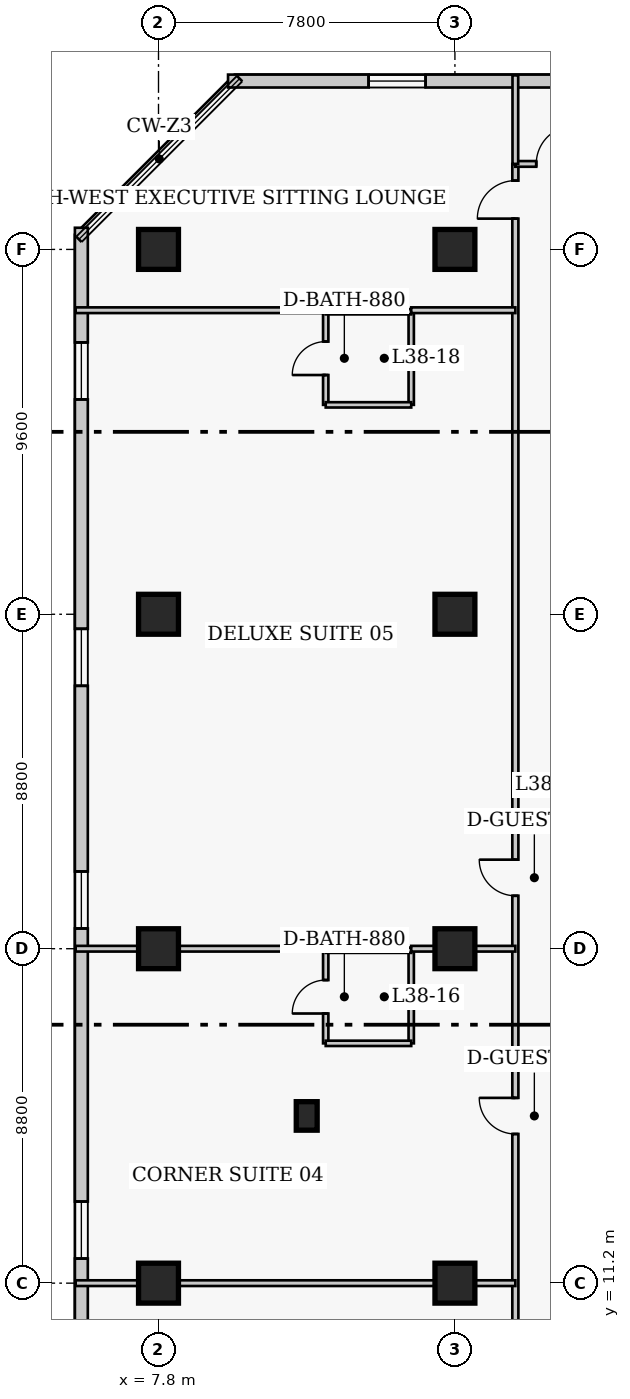
"""IFC4 building model, lengths in metres.
Left out: names, types, materials, properties, quantities, classifications, styles, units other than length and angle.
Written with IfcOpenShell. Run it as: python <this file> out.ifc"""

import sys

from ifc_helpers import new_model, si_unit, direction, frame, frame_2d, origin, origin_2d, place, context, subcontext, project, spatial, rectangle, extrude, element, fill, save


model = new_model("IFC4")
c1 = context("Model", 3, precision=1e-05, world=origin(), true_north=direction((0.0, 1.0)))
c2 = subcontext(c1, "Body", "Model", "MODEL_VIEW")
j1 = project(units=[si_unit("LENGTHUNIT", "METRE"), si_unit("PLANEANGLEUNIT", "RADIAN")], contexts=[c1])
p1 = place(None, origin())
s1 = spatial("IfcSite", under=j1, at=p1, CompositionType="ELEMENT")
p2 = place(p1, origin())
s2 = spatial("IfcBuilding", under=s1, at=p2, CompositionType="ELEMENT")
p3 = place(p2, frame((0.0, 0.0, 153.6)))
s3 = spatial("IfcBuildingStorey", under=s2, at=p3, CompositionType="ELEMENT", Elevation=153.6)
for number, where, z_axis, x_axis in (
    (1, (7.8, 11.2, 0.0), (0.0, 0.0, 1.0), (1.0, 0.0, 0.0)),
    (2, (7.8, 20.0, 0.0), (0.0, 0.0, 1.0), (1.0, 0.0, 0.0)),
    (3, (7.8, 28.8, 0.0), (0.0, 0.0, 1.0), (1.0, 0.0, 0.0)),
    (4, (7.8, 38.4, 0.0), (0.0, 0.0, 1.0), (1.0, 0.0, 0.0)),
    (5, (15.6, 11.2, 0.0), (0.0, 0.0, 1.0), (1.0, 0.0, 0.0)),
    (6, (15.6, 20.0, 0.0), (0.0, 0.0, 1.0), (1.0, 0.0, 0.0)),
    (7, (15.6, 28.8, 0.0), (0.0, 0.0, 1.0), (1.0, 0.0, 0.0)),
    (8, (15.6, 38.4, 0.0), (0.0, 0.0, 1.0), (1.0, 0.0, 0.0)),
):
    element("IfcColumn", number, at=place(p3, frame(where, z_axis=z_axis, x_axis=x_axis)), inside=s3, PredefinedType="COLUMN", context=c2, shape_type="SweptSolid", body=[
        extrude(rectangle(XDim=1.05, YDim=1.05, at=origin_2d()), origin(), (0.0, 0.0, 1.0), 3.8),
    ])
p4 = place(p3, frame((11.7, 15.6, 0.0), z_axis=(0.0, 0.0, 1.0), x_axis=(1.0, 0.0, 0.0)))
e9 = element("IfcColumn", 9, at=p4, inside=s3, PredefinedType="PILASTER", context=c2, shape_type="SweptSolid", body=[
    extrude(rectangle(XDim=0.55, YDim=0.75, at=origin_2d()), origin(), (0.0, 0.0, 1.0), 3.8),
])
p5 = place(p3, frame((36.32, 42.83, 0.0), z_axis=(0.0, 0.0, 1.0), x_axis=(-1.0, 0.0, 0.0)))
e10 = element("IfcWall", 10, at=p5, inside=s3, PredefinedType="SOLIDWALL", context=c2, shape_type="SweptSolid", body=[
    extrude(rectangle(XDim=26.69, YDim=0.34, at=frame_2d((13.345, 0.0))), origin(), (0.0, 0.0, 1.0), 3.55),
])
p6 = place(p5, frame((2.548, 0.0, 0.85)))
e11 = element("IfcOpeningElement", 11, at=p6, cuts=e10, PredefinedType="OPENING", context=c2, shape_type="SweptSolid", body=[
    extrude(rectangle(XDim=1.5, YDim=1.75, at=frame_2d((0.75, 0.875))), frame((0.0, 0.18, 0.0), z_axis=(0.0, -1.0, 0.0), x_axis=(1.0, 0.0, 0.0)), (0.0, 0.0, 1.0), 0.36),
])
p7 = place(p5, frame((12.595, 0.0, 0.85)))
e12 = element("IfcOpeningElement", 12, at=p7, cuts=e10, PredefinedType="OPENING", context=c2, shape_type="SweptSolid", body=[
    extrude(rectangle(XDim=1.5, YDim=1.75, at=frame_2d((0.75, 0.875))), frame((0.0, 0.18, 0.0), z_axis=(0.0, -1.0, 0.0), x_axis=(1.0, 0.0, 0.0)), (0.0, 0.0, 1.0), 0.36),
])
p8 = place(p5, frame((21.492, 0.0, 0.85)))
e13 = element("IfcOpeningElement", 13, at=p8, cuts=e10, PredefinedType="OPENING", context=c2, shape_type="SweptSolid", body=[
    extrude(rectangle(XDim=1.5, YDim=1.75, at=frame_2d((0.75, 0.875))), frame((0.0, 0.18, 0.0), z_axis=(0.0, -1.0, 0.0), x_axis=(1.0, 0.0, 0.0)), (0.0, 0.0, 1.0), 0.36),
])
p9 = place(p3, frame((5.77, 38.97, 0.0), z_axis=(0.0, 0.0, 1.0), x_axis=(0.0, -1.0, 0.0)))
e14 = element("IfcWall", 14, at=p9, inside=s3, PredefinedType="SOLIDWALL", context=c2, shape_type="SweptSolid", body=[
    extrude(rectangle(XDim=30.14, YDim=0.34, at=frame_2d((15.07, 0.0))), origin(), (0.0, 0.0, 1.0), 3.55),
])
p10 = place(p9, frame((3.018, 0.0, 0.85)))
e15 = element("IfcOpeningElement", 15, at=p10, cuts=e14, PredefinedType="OPENING", context=c2, shape_type="SweptSolid", body=[
    extrude(rectangle(XDim=1.5, YDim=1.75, at=frame_2d((0.75, 0.875))), frame((0.0, 0.18, 0.0), z_axis=(0.0, -1.0, 0.0), x_axis=(1.0, 0.0, 0.0)), (0.0, 0.0, 1.0), 0.36),
])
p11 = place(p9, frame((10.552, 0.0, 0.85)))
e16 = element("IfcOpeningElement", 16, at=p11, cuts=e14, PredefinedType="OPENING", context=c2, shape_type="SweptSolid", body=[
    extrude(rectangle(XDim=1.5, YDim=1.75, at=frame_2d((0.75, 0.875))), frame((0.0, 0.18, 0.0), z_axis=(0.0, -1.0, 0.0), x_axis=(1.0, 0.0, 0.0)), (0.0, 0.0, 1.0), 0.36),
])
p12 = place(p9, frame((16.938, 0.0, 0.85)))
e17 = element("IfcOpeningElement", 17, at=p12, cuts=e14, PredefinedType="OPENING", context=c2, shape_type="SweptSolid", body=[
    extrude(rectangle(XDim=1.5, YDim=1.75, at=frame_2d((0.75, 0.875))), frame((0.0, 0.18, 0.0), z_axis=(0.0, -1.0, 0.0), x_axis=(1.0, 0.0, 0.0)), (0.0, 0.0, 1.0), 0.36),
])
p13 = place(p9, frame((25.623, 0.0, 0.85)))
e18 = element("IfcOpeningElement", 18, at=p13, cuts=e14, PredefinedType="OPENING", context=c2, shape_type="SweptSolid", body=[
    extrude(rectangle(XDim=1.5, YDim=1.75, at=frame_2d((0.75, 0.875))), frame((0.0, 0.18, 0.0), z_axis=(0.0, -1.0, 0.0), x_axis=(1.0, 0.0, 0.0)), (0.0, 0.0, 1.0), 0.36),
])
p14 = place(p3, frame((17.19, 6.85, 0.0), z_axis=(0.0, 0.0, 1.0), x_axis=(0.0, 1.0, 0.0)))
e19 = element("IfcWall", 19, at=p14, inside=s3, PredefinedType="PARTITIONING", context=c2, shape_type="SweptSolid", body=[
    extrude(rectangle(XDim=33.8, YDim=0.16, at=frame_2d((16.9, 0.0))), origin(), (0.0, 0.0, 1.0), 3.55),
])
p15 = place(p14, frame((1.7, 0.0, 0.0)))
e20 = element("IfcOpeningElement", 20, at=p15, cuts=e19, PredefinedType="OPENING", context=c2, shape_type="SweptSolid", body=[
    extrude(rectangle(XDim=0.95, YDim=2.1, at=frame_2d((0.475, 1.05))), frame((0.0, 0.09, 0.0), z_axis=(0.0, -1.0, 0.0), x_axis=(1.0, 0.0, 0.0)), (0.0, 0.0, 1.0), 0.18),
])
p16 = place(p14, frame((8.275, 0.0, 0.0)))
e21 = element("IfcOpeningElement", 21, at=p16, cuts=e19, PredefinedType="OPENING", context=c2, shape_type="SweptSolid", body=[
    extrude(rectangle(XDim=0.95, YDim=2.1, at=frame_2d((0.475, 1.05))), frame((0.0, 0.09, 0.0), z_axis=(0.0, -1.0, 0.0), x_axis=(1.0, 0.0, 0.0)), (0.0, 0.0, 1.0), 0.18),
])
p17 = place(p14, frame((14.543, 0.0, 0.0)))
e22 = element("IfcOpeningElement", 22, at=p17, cuts=e19, PredefinedType="OPENING", context=c2, shape_type="SweptSolid", body=[
    extrude(rectangle(XDim=0.95, YDim=2.1, at=frame_2d((0.475, 1.05))), frame((0.0, 0.09, 0.0), z_axis=(0.0, -1.0, 0.0), x_axis=(1.0, 0.0, 0.0)), (0.0, 0.0, 1.0), 0.18),
])
p18 = place(p14, frame((32.36, 0.0, 0.0)))
e23 = element("IfcOpeningElement", 23, at=p18, cuts=e19, PredefinedType="OPENING", context=c2, shape_type="SweptSolid", body=[
    extrude(rectangle(XDim=1.0, YDim=2.15, at=frame_2d((0.5, 1.075))), frame((0.0, 0.09, 0.0), z_axis=(0.0, -1.0, 0.0), x_axis=(1.0, 0.0, 0.0)), (0.0, 0.0, 1.0), 0.18),
])
p19 = place(p3, frame((17.19, 40.65, 0.0), z_axis=(0.0, 0.0, 1.0), x_axis=(1.0, 0.0, 0.0)))
e24 = element("IfcWall", 24, at=p19, inside=s3, PredefinedType="PARTITIONING", context=c2, shape_type="SweptSolid", body=[
    extrude(rectangle(XDim=4.91, YDim=0.15, at=frame_2d((2.455, 0.0))), origin(), (0.0, 0.0, 1.0), 3.55),
])
p20 = place(p19, frame((0.55, 0.0, 0.0)))
e25 = element("IfcOpeningElement", 25, at=p20, cuts=e24, PredefinedType="OPENING", context=c2, shape_type="SweptSolid", body=[
    extrude(rectangle(XDim=1.0, YDim=2.15, at=frame_2d((0.5, 1.075))), frame((0.0, 0.085, 0.0), z_axis=(0.0, -1.0, 0.0), x_axis=(1.0, 0.0, 0.0)), (0.0, 0.0, 1.0), 0.17),
])
p21 = place(p3, frame((17.19, 40.65, 0.0), z_axis=(0.0, 0.0, 1.0), x_axis=(0.0, 1.0, 0.0)))
e26 = element("IfcWall", 26, at=p21, inside=s3, PredefinedType="PARTITIONING", context=c2, shape_type="SweptSolid", body=[
    extrude(rectangle(XDim=2.33, YDim=0.15, at=frame_2d((1.165, 0.0))), origin(), (0.0, 0.0, 1.0), 3.55),
])
p22 = place(p3, frame((5.62, 11.2, 0.0), z_axis=(0.0, 0.0, 1.0), x_axis=(1.0, 0.0, 0.0)))
e27 = element("IfcWall", 27, at=p22, inside=s3, PredefinedType="PARTITIONING", context=c2, shape_type="SweptSolid", body=[
    extrude(rectangle(XDim=11.57, YDim=0.15, at=frame_2d((5.785, 0.0))), origin(), (0.0, 0.0, 1.0), 2.778),
])
p23 = place(p3, frame((12.2, 17.51, 0.0), z_axis=(0.0, 0.0, 1.0), x_axis=(0.0, 1.0, 0.0)))
e28 = element("IfcWall", 28, at=p23, inside=s3, PredefinedType="PLUMBINGWALL", context=c2, shape_type="SweptSolid", body=[
    extrude(rectangle(XDim=2.45, YDim=0.14, at=frame_2d((1.225, 0.0))), origin(), (0.0, 0.0, 1.0), 3.55),
])
p24 = place(p23, frame((0.785, 0.0, 0.0)))
e29 = element("IfcOpeningElement", 29, at=p24, cuts=e28, PredefinedType="OPENING", context=c2, shape_type="SweptSolid", body=[
    extrude(rectangle(XDim=0.88, YDim=2.05, at=frame_2d((0.44, 1.025))), frame((0.0, 0.08, 0.0), z_axis=(0.0, -1.0, 0.0), x_axis=(1.0, 0.0, 0.0)), (0.0, 0.0, 1.0), 0.16),
])
p25 = place(p3, frame((14.45, 17.51, 0.0), z_axis=(0.0, 0.0, 1.0), x_axis=(0.0, 1.0, 0.0)))
e30 = element("IfcWall", 30, at=p25, inside=s3, PredefinedType="PLUMBINGWALL", context=c2, shape_type="SweptSolid", body=[
    extrude(rectangle(XDim=2.45, YDim=0.14, at=frame_2d((1.225, 0.0))), origin(), (0.0, 0.0, 1.0), 3.55),
])
p26 = place(p3, frame((12.2, 17.51, 0.0), z_axis=(0.0, 0.0, 1.0), x_axis=(1.0, 0.0, 0.0)))
e31 = element("IfcWall", 31, at=p26, inside=s3, PredefinedType="PLUMBINGWALL", context=c2, shape_type="SweptSolid", body=[
    extrude(rectangle(XDim=2.25, YDim=0.14, at=frame_2d((1.125, 0.0))), origin(), (0.0, 0.0, 1.0), 3.55),
])
p27 = place(p3, frame((12.2, 19.96, 0.0), z_axis=(0.0, 0.0, 1.0), x_axis=(1.0, 0.0, 0.0)))
e32 = element("IfcWall", 32, at=p27, inside=s3, PredefinedType="PLUMBINGWALL", context=c2, shape_type="SweptSolid", body=[
    extrude(rectangle(XDim=2.25, YDim=0.14, at=frame_2d((1.125, 0.0))), origin(), (0.0, 0.0, 1.0), 2.9),
])
p28 = place(p3, frame((5.62, 20.0, 0.0), z_axis=(0.0, 0.0, 1.0), x_axis=(1.0, 0.0, 0.0)))
e33 = element("IfcWall", 33, at=p28, inside=s3, PredefinedType="PARTITIONING", context=c2, shape_type="SweptSolid", body=[
    extrude(rectangle(XDim=6.58, YDim=0.15, at=frame_2d((3.29, 0.0))), origin(), (0.0, 0.0, 1.0), 2.778),
])
p29 = place(p3, frame((14.45, 20.0, 0.0), z_axis=(0.0, 0.0, 1.0), x_axis=(1.0, 0.0, 0.0)))
e34 = element("IfcWall", 34, at=p29, inside=s3, PredefinedType="PARTITIONING", context=c2, shape_type="SweptSolid", body=[
    extrude(rectangle(XDim=2.74, YDim=0.15, at=frame_2d((1.37, 0.0))), origin(), (0.0, 0.0, 1.0), 2.778),
])
p30 = place(p3, frame((12.2, 34.31, 0.0), z_axis=(0.0, 0.0, 1.0), x_axis=(0.0, 1.0, 0.0)))
e35 = element("IfcWall", 35, at=p30, inside=s3, PredefinedType="PLUMBINGWALL", context=c2, shape_type="SweptSolid", body=[
    extrude(rectangle(XDim=2.45, YDim=0.14, at=frame_2d((1.225, 0.0))), origin(), (0.0, 0.0, 1.0), 3.55),
])
p31 = place(p30, frame((0.785, 0.0, 0.0)))
e36 = element("IfcOpeningElement", 36, at=p31, cuts=e35, PredefinedType="OPENING", context=c2, shape_type="SweptSolid", body=[
    extrude(rectangle(XDim=0.88, YDim=2.05, at=frame_2d((0.44, 1.025))), frame((0.0, 0.08, 0.0), z_axis=(0.0, -1.0, 0.0), x_axis=(1.0, 0.0, 0.0)), (0.0, 0.0, 1.0), 0.16),
])
p32 = place(p3, frame((14.45, 34.31, 0.0), z_axis=(0.0, 0.0, 1.0), x_axis=(0.0, 1.0, 0.0)))
e37 = element("IfcWall", 37, at=p32, inside=s3, PredefinedType="PLUMBINGWALL", context=c2, shape_type="SweptSolid", body=[
    extrude(rectangle(XDim=2.45, YDim=0.14, at=frame_2d((1.225, 0.0))), origin(), (0.0, 0.0, 1.0), 3.55),
])
for number, where, z_axis, x_axis in (
    (38, (12.2, 34.31, 0.0), (0.0, 0.0, 1.0), (1.0, 0.0, 0.0)),
    (39, (12.2, 36.76, 0.0), (0.0, 0.0, 1.0), (1.0, 0.0, 0.0)),
):
    element("IfcWall", number, at=place(p3, frame(where, z_axis=z_axis, x_axis=x_axis)), inside=s3, PredefinedType="PLUMBINGWALL", context=c2, shape_type="SweptSolid", body=[
        extrude(rectangle(XDim=2.25, YDim=0.14, at=frame_2d((1.125, 0.0))), origin(), (0.0, 0.0, 1.0), 3.55),
    ])
p33 = place(p3, frame((5.62, 36.8, 0.0), z_axis=(0.0, 0.0, 1.0), x_axis=(1.0, 0.0, 0.0)))
e40 = element("IfcWall", 40, at=p33, inside=s3, PredefinedType="PARTITIONING", context=c2, shape_type="SweptSolid", body=[
    extrude(rectangle(XDim=6.58, YDim=0.15, at=frame_2d((3.29, 0.0))), origin(), (0.0, 0.0, 1.0), 3.55),
])
p34 = place(p3, frame((14.45, 36.8, 0.0), z_axis=(0.0, 0.0, 1.0), x_axis=(1.0, 0.0, 0.0)))
e41 = element("IfcWall", 41, at=p34, inside=s3, PredefinedType="PARTITIONING", context=c2, shape_type="SweptSolid", body=[
    extrude(rectangle(XDim=2.74, YDim=0.15, at=frame_2d((1.37, 0.0))), origin(), (0.0, 0.0, 1.0), 3.55),
])
p35 = place(p8, origin())
e42 = element("IfcWindow", 42, at=p35, inside=s3, PartitioningType="SINGLE_PANEL", PredefinedType="WINDOW", context=c2, shape_type="SweptSolid", body=[
    extrude(rectangle(XDim=1.5, YDim=1.75, at=frame_2d((0.75, 0.875))), frame((0.0, 0.03, 0.0), z_axis=(0.0, -1.0, 0.0), x_axis=(1.0, 0.0, 0.0)), (0.0, 0.0, 1.0), 0.06),
])
fill(e13, e42)
p36 = place(p10, origin())
e43 = element("IfcWindow", 43, at=p36, inside=s3, PartitioningType="SINGLE_PANEL", PredefinedType="WINDOW", context=c2, shape_type="SweptSolid", body=[
    extrude(rectangle(XDim=1.5, YDim=1.75, at=frame_2d((0.75, 0.875))), frame((0.0, 0.03, 0.0), z_axis=(0.0, -1.0, 0.0), x_axis=(1.0, 0.0, 0.0)), (0.0, 0.0, 1.0), 0.06),
])
fill(e15, e43)
p37 = place(p11, origin())
e44 = element("IfcWindow", 44, at=p37, inside=s3, PartitioningType="SINGLE_PANEL", PredefinedType="WINDOW", context=c2, shape_type="SweptSolid", body=[
    extrude(rectangle(XDim=1.5, YDim=1.75, at=frame_2d((0.75, 0.875))), frame((0.0, 0.03, 0.0), z_axis=(0.0, -1.0, 0.0), x_axis=(1.0, 0.0, 0.0)), (0.0, 0.0, 1.0), 0.06),
])
fill(e16, e44)
p38 = place(p12, origin())
e45 = element("IfcWindow", 45, at=p38, inside=s3, PartitioningType="SINGLE_PANEL", PredefinedType="WINDOW", context=c2, shape_type="SweptSolid", body=[
    extrude(rectangle(XDim=1.5, YDim=1.75, at=frame_2d((0.75, 0.875))), frame((0.0, 0.03, 0.0), z_axis=(0.0, -1.0, 0.0), x_axis=(1.0, 0.0, 0.0)), (0.0, 0.0, 1.0), 0.06),
])
fill(e17, e45)
p39 = place(p13, origin())
e46 = element("IfcWindow", 46, at=p39, inside=s3, PartitioningType="SINGLE_PANEL", PredefinedType="WINDOW", context=c2, shape_type="SweptSolid", body=[
    extrude(rectangle(XDim=1.5, YDim=1.75, at=frame_2d((0.75, 0.875))), frame((0.0, 0.03, 0.0), z_axis=(0.0, -1.0, 0.0), x_axis=(1.0, 0.0, 0.0)), (0.0, 0.0, 1.0), 0.06),
])
fill(e18, e46)
p40 = place(p20, origin())
e47 = element("IfcDoor", 47, at=p40, inside=s3, OperationType="SINGLE_SWING_RIGHT", PredefinedType="DOOR", context=c2, shape_type="SweptSolid", body=[
    extrude(rectangle(XDim=1.0, YDim=2.15, at=frame_2d((0.5, 1.075))), frame((0.0, 0.025, 0.0), z_axis=(0.0, -1.0, 0.0), x_axis=(1.0, 0.0, 0.0)), (0.0, 0.0, 1.0), 0.05),
])
fill(e25, e47)
p41 = place(p24, origin())
e48 = element("IfcDoor", 48, at=p41, inside=s3, OperationType="SINGLE_SWING_LEFT", PredefinedType="DOOR", context=c2, shape_type="SweptSolid", body=[
    extrude(rectangle(XDim=0.88, YDim=2.05, at=frame_2d((0.44, 1.025))), frame((0.0, 0.025, 0.0), z_axis=(0.0, -1.0, 0.0), x_axis=(1.0, 0.0, 0.0)), (0.0, 0.0, 1.0), 0.05),
])
fill(e29, e48)
p42 = place(p16, origin())
e49 = element("IfcDoor", 49, at=p42, inside=s3, OperationType="SINGLE_SWING_RIGHT", PredefinedType="DOOR", context=c2, shape_type="SweptSolid", body=[
    extrude(rectangle(XDim=0.95, YDim=2.1, at=frame_2d((0.475, 1.05))), frame((0.0, 0.025, 0.0), z_axis=(0.0, -1.0, 0.0), x_axis=(1.0, 0.0, 0.0)), (0.0, 0.0, 1.0), 0.05),
])
fill(e21, e49)
p43 = place(p31, origin())
e50 = element("IfcDoor", 50, at=p43, inside=s3, OperationType="SINGLE_SWING_LEFT", PredefinedType="DOOR", context=c2, shape_type="SweptSolid", body=[
    extrude(rectangle(XDim=0.88, YDim=2.05, at=frame_2d((0.44, 1.025))), frame((0.0, 0.025, 0.0), z_axis=(0.0, -1.0, 0.0), x_axis=(1.0, 0.0, 0.0)), (0.0, 0.0, 1.0), 0.05),
])
fill(e36, e50)
p44 = place(p17, origin())
e51 = element("IfcDoor", 51, at=p44, inside=s3, OperationType="SINGLE_SWING_RIGHT", PredefinedType="DOOR", context=c2, shape_type="SweptSolid", body=[
    extrude(rectangle(XDim=0.95, YDim=2.1, at=frame_2d((0.475, 1.05))), frame((0.0, 0.025, 0.0), z_axis=(0.0, -1.0, 0.0), x_axis=(1.0, 0.0, 0.0)), (0.0, 0.0, 1.0), 0.05),
])
fill(e22, e51)
p45 = place(p18, origin())
e52 = element("IfcDoor", 52, at=p45, inside=s3, OperationType="SINGLE_SWING_LEFT", PredefinedType="DOOR", context=c2, shape_type="SweptSolid", body=[
    extrude(rectangle(XDim=1.0, YDim=2.15, at=frame_2d((0.5, 1.075))), frame((0.0, 0.025, 0.0), z_axis=(0.0, -1.0, 0.0), x_axis=(1.0, 0.0, 0.0)), (0.0, 0.0, 1.0), 0.05),
])
fill(e23, e52)
save(model, sys.argv[1])
